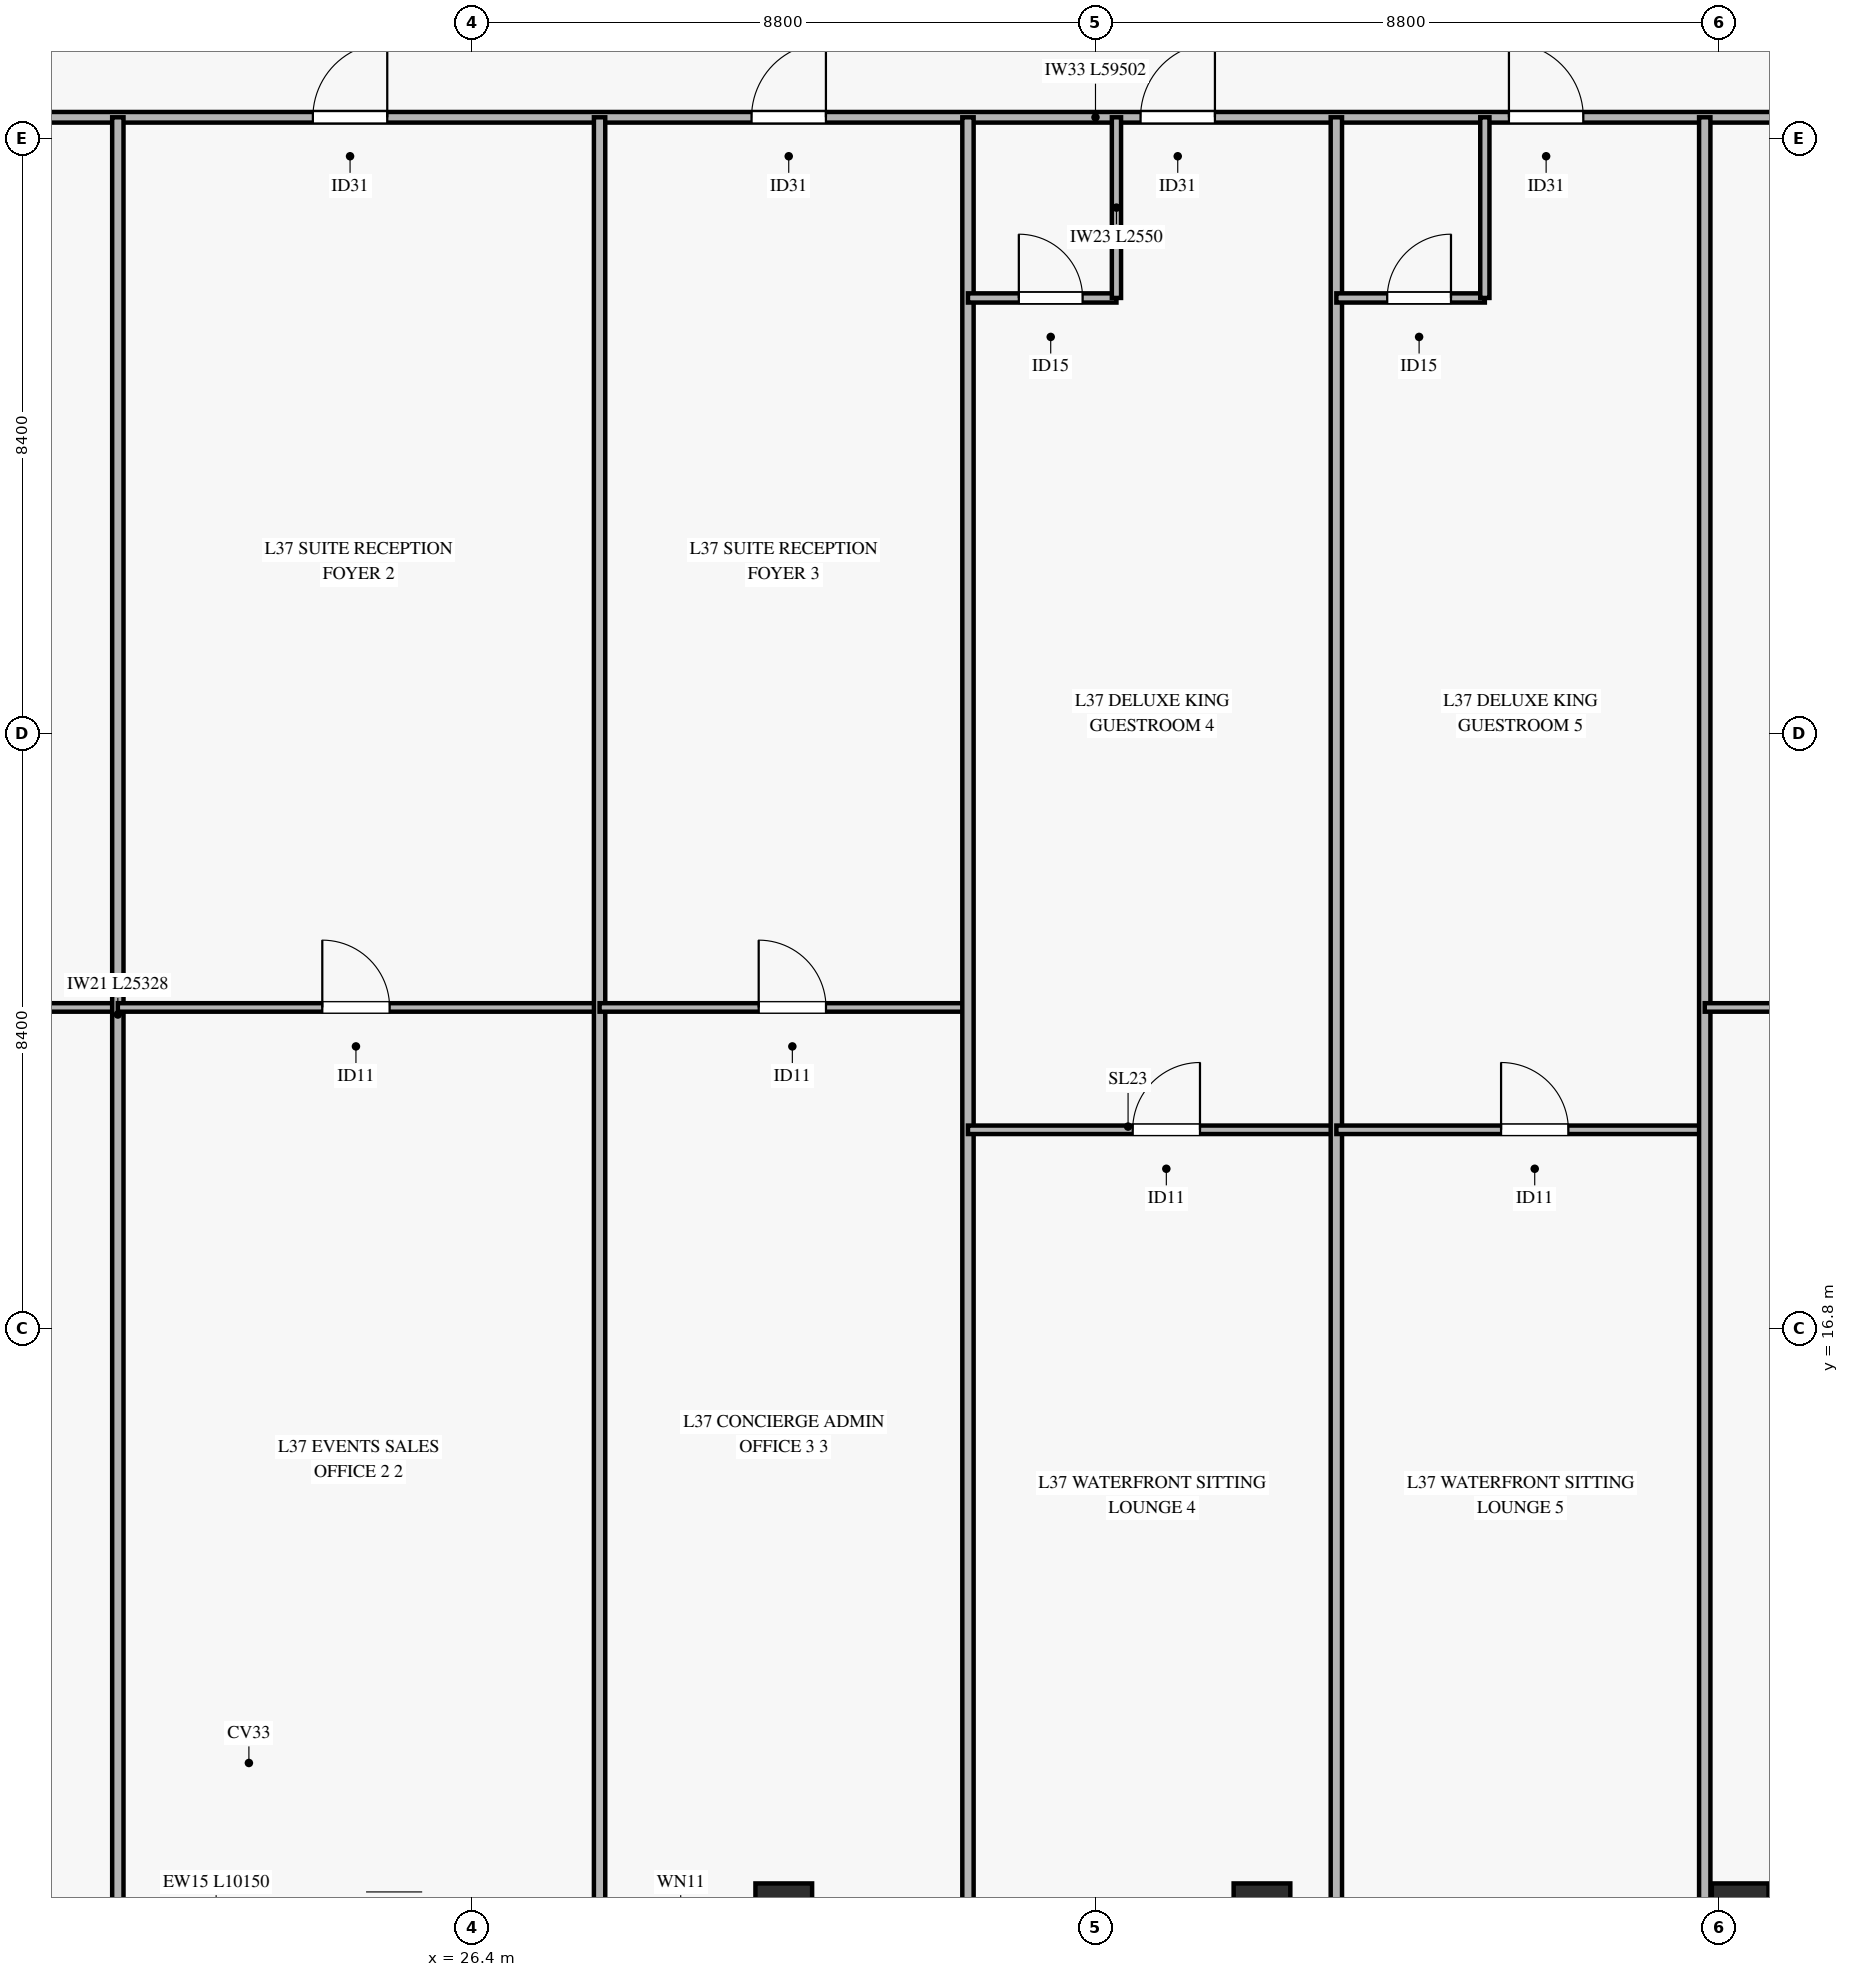
"""IFC4 building model, lengths in metres.
Left out: names, types, materials, properties, quantities, classifications, styles, units other than length and angle.
Written with IfcOpenShell. Run it as: python <this file> out.ifc"""

import sys

from ifc_helpers import new_model, si_unit, direction, frame, frame_2d, origin, origin_2d, place, context, subcontext, project, spatial, rectangle, hollow_rectangle, extrude, source, transform, mapped, element, fill, save


model = new_model("IFC4")
c1 = context("Model", 3, precision=1e-05, world=origin(), true_north=direction((0.0, 1.0)))
c2 = subcontext(c1, "Body", "Model", "MODEL_VIEW")
j1 = project(units=[si_unit("LENGTHUNIT", "METRE"), si_unit("PLANEANGLEUNIT", "RADIAN")], contexts=[c1])
p1 = place(None, origin())
s1 = spatial("IfcSite", under=j1, at=p1, CompositionType="ELEMENT")
p2 = place(p1, origin())
s2 = spatial("IfcBuilding", under=s1, at=p2, CompositionType="ELEMENT")
p3 = place(p2, frame((0.0, 0.0, 152.7)))
s3 = spatial("IfcBuildingStorey", under=s2, at=p3, CompositionType="ELEMENT", Elevation=152.7)
m1 = source(origin(), c2, "Body", "SweptSolid", [
    extrude(hollow_rectangle(XDim=0.8, YDim=0.8, WallThickness=0.036, at=origin_2d()), origin(), (0.0, 0.0, 1.0), 3.27),
])
for number, where, z_axis, x_axis in (
    (1, (30.8, 8.572, 0.0), (0.0, 0.0, 1.0), (1.0, 0.0, 0.0)),
    (2, (37.55, 8.572, 0.0), (0.0, 0.0, 1.0), (1.0, 0.0, 0.0)),
    (3, (44.3, 8.572, 0.0), (0.0, 0.0, 1.0), (1.0, 0.0, 0.0)),
):
    element("IfcColumn", number, at=place(p3, frame(where, z_axis=z_axis, x_axis=x_axis)), inside=s3, PredefinedType="COLUMN", context=c2, shape_type="MappedRepresentation", body=[
        mapped(m1, transform((0.0, 0.0, 0.0), x_axis=(1.0, 0.0, 0.0), y_axis=(0.0, 1.0, 0.0), z_axis=(0.0, 0.0, 1.0), scale=1.0)),
    ])
p4 = place(p3, frame((5.449, 33.9, 0.0), z_axis=(0.0, 0.0, 1.0), x_axis=(1.0, 0.0, 0.0)))
e4 = element("IfcWall", 4, at=p4, inside=s3, PredefinedType="PARTITIONING", context=c2, shape_type="SweptSolid", body=[
    extrude(rectangle(XDim=59.502, YDim=0.15, at=frame_2d((29.751, 0.0))), origin(), (0.0, 0.0, 1.0), 2.455),
])
p5 = place(p4, frame((6.355, 0.0, 0.0)))
e5 = element("IfcOpeningElement", 5, at=p5, cuts=e4, PredefinedType="OPENING", context=c2, shape_type="SweptSolid", body=[
    extrude(rectangle(XDim=1.05, YDim=2.15, at=frame_2d((0.525, 1.075))), frame((0.0, 0.085, 0.0), z_axis=(0.0, -1.0, 0.0), x_axis=(1.0, 0.0, 0.0)), (0.0, 0.0, 1.0), 0.17),
])
p6 = place(p4, frame((18.704, 0.0, 0.0)))
e6 = element("IfcOpeningElement", 6, at=p6, cuts=e4, PredefinedType="OPENING", context=c2, shape_type="SweptSolid", body=[
    extrude(rectangle(XDim=1.05, YDim=2.15, at=frame_2d((0.525, 1.075))), frame((0.0, 0.085, 0.0), z_axis=(0.0, -1.0, 0.0), x_axis=(1.0, 0.0, 0.0)), (0.0, 0.0, 1.0), 0.17),
])
p7 = place(p4, frame((24.896, 0.0, 0.0)))
e7 = element("IfcOpeningElement", 7, at=p7, cuts=e4, PredefinedType="OPENING", context=c2, shape_type="SweptSolid", body=[
    extrude(rectangle(XDim=1.05, YDim=2.15, at=frame_2d((0.525, 1.075))), frame((0.0, 0.085, 0.0), z_axis=(0.0, -1.0, 0.0), x_axis=(1.0, 0.0, 0.0)), (0.0, 0.0, 1.0), 0.17),
])
p8 = place(p4, frame((30.387, 0.0, 0.0)))
e8 = element("IfcOpeningElement", 8, at=p8, cuts=e4, PredefinedType="OPENING", context=c2, shape_type="SweptSolid", body=[
    extrude(rectangle(XDim=1.05, YDim=2.15, at=frame_2d((0.525, 1.075))), frame((0.0, 0.085, 0.0), z_axis=(0.0, -1.0, 0.0), x_axis=(1.0, 0.0, 0.0)), (0.0, 0.0, 1.0), 0.17),
])
p9 = place(p4, frame((35.587, 0.0, 0.0)))
e9 = element("IfcOpeningElement", 9, at=p9, cuts=e4, PredefinedType="OPENING", context=c2, shape_type="SweptSolid", body=[
    extrude(rectangle(XDim=1.05, YDim=2.15, at=frame_2d((0.525, 1.075))), frame((0.0, 0.085, 0.0), z_axis=(0.0, -1.0, 0.0), x_axis=(1.0, 0.0, 0.0)), (0.0, 0.0, 1.0), 0.17),
])
p10 = place(p4, frame((46.482, 0.0, 0.0)))
e10 = element("IfcOpeningElement", 10, at=p10, cuts=e4, PredefinedType="OPENING", context=c2, shape_type="SweptSolid", body=[
    extrude(rectangle(XDim=1.05, YDim=2.15, at=frame_2d((0.525, 1.075))), frame((0.0, 0.085, 0.0), z_axis=(0.0, -1.0, 0.0), x_axis=(1.0, 0.0, 0.0)), (0.0, 0.0, 1.0), 0.17),
])
p11 = place(p3, frame((5.449, 21.336, 0.0), z_axis=(0.0, 0.0, 1.0), x_axis=(1.0, 0.0, 0.0)))
e11 = element("IfcWall", 11, at=p11, inside=s3, PredefinedType="PARTITIONING", context=c2, shape_type="SweptSolid", body=[
    extrude(rectangle(XDim=15.951, YDim=0.12, at=frame_2d((7.976, 0.0))), origin(), (0.0, 0.0, 1.0), 2.455),
])
p12 = place(p11, frame((6.666, 0.0, 0.0)))
e12 = element("IfcOpeningElement", 12, at=p12, cuts=e11, PredefinedType="OPENING", context=c2, shape_type="SweptSolid", body=[
    extrude(rectangle(XDim=0.95, YDim=2.1, at=frame_2d((0.475, 1.05))), frame((0.0, 0.07, 0.0), z_axis=(0.0, -1.0, 0.0), x_axis=(1.0, 0.0, 0.0)), (0.0, 0.0, 1.0), 0.14),
])
p13 = place(p3, frame((21.4, 8.572, 0.0), z_axis=(0.0, 0.0, 1.0), x_axis=(0.0, 1.0, 0.0)))
e13 = element("IfcWall", 13, at=p13, inside=s3, PredefinedType="PARTITIONING", context=c2, shape_type="SweptSolid", body=[
    extrude(rectangle(XDim=25.328, YDim=0.16, at=frame_2d((12.664, 0.0))), origin(), (0.0, 0.0, 1.0), 2.755),
])
p14 = place(p3, frame((21.4, 21.336, 0.0), z_axis=(0.0, 0.0, 1.0), x_axis=(1.0, 0.0, 0.0)))
e14 = element("IfcWall", 14, at=p14, inside=s3, PredefinedType="PARTITIONING", context=c2, shape_type="SweptSolid", body=[
    extrude(rectangle(XDim=6.8, YDim=0.12, at=frame_2d((3.4, 0.0))), origin(), (0.0, 0.0, 1.0), 3.27),
])
p15 = place(p14, frame((2.886, 0.0, 0.0)))
e15 = element("IfcOpeningElement", 15, at=p15, cuts=e14, PredefinedType="OPENING", context=c2, shape_type="SweptSolid", body=[
    extrude(rectangle(XDim=0.95, YDim=2.1, at=frame_2d((0.475, 1.05))), frame((0.0, 0.07, 0.0), z_axis=(0.0, -1.0, 0.0), x_axis=(1.0, 0.0, 0.0)), (0.0, 0.0, 1.0), 0.14),
])
p16 = place(p3, frame((28.2, 8.572, 0.0), z_axis=(0.0, 0.0, 1.0), x_axis=(0.0, 1.0, 0.0)))
e16 = element("IfcWall", 16, at=p16, inside=s3, PredefinedType="PARTITIONING", context=c2, shape_type="SweptSolid", body=[
    extrude(rectangle(XDim=25.328, YDim=0.16, at=frame_2d((12.664, 0.0))), origin(), (0.0, 0.0, 1.0), 2.755),
])
p17 = place(p3, frame((28.2, 21.336, 0.0), z_axis=(0.0, 0.0, 1.0), x_axis=(1.0, 0.0, 0.0)))
e17 = element("IfcWall", 17, at=p17, inside=s3, PredefinedType="PARTITIONING", context=c2, shape_type="SweptSolid", body=[
    extrude(rectangle(XDim=5.2, YDim=0.12, at=frame_2d((2.6, 0.0))), origin(), (0.0, 0.0, 1.0), 2.455),
])
p18 = place(p17, frame((2.246, 0.0, 0.0)))
e18 = element("IfcOpeningElement", 18, at=p18, cuts=e17, PredefinedType="OPENING", context=c2, shape_type="SweptSolid", body=[
    extrude(rectangle(XDim=0.95, YDim=2.1, at=frame_2d((0.475, 1.05))), frame((0.0, 0.07, 0.0), z_axis=(0.0, -1.0, 0.0), x_axis=(1.0, 0.0, 0.0)), (0.0, 0.0, 1.0), 0.14),
])
p19 = place(p3, frame((33.4, 8.572, 0.0), z_axis=(0.0, 0.0, 1.0), x_axis=(0.0, 1.0, 0.0)))
e19 = element("IfcWall", 19, at=p19, inside=s3, PredefinedType="PARTITIONING", context=c2, shape_type="SweptSolid", body=[
    extrude(rectangle(XDim=25.328, YDim=0.16, at=frame_2d((12.664, 0.0))), origin(), (0.0, 0.0, 1.0), 2.755),
])
p20 = place(p3, frame((33.4, 31.35, 0.0), z_axis=(0.0, 0.0, 1.0), x_axis=(1.0, 0.0, 0.0)))
e20 = element("IfcWall", 20, at=p20, inside=s3, PredefinedType="PARTITIONING", context=c2, shape_type="SweptSolid", body=[
    extrude(rectangle(XDim=2.096, YDim=0.13, at=frame_2d((1.048, 0.0))), origin(), (0.0, 0.0, 1.0), 3.27),
])
p21 = place(p20, frame((0.718, 0.0, 0.0)))
e21 = element("IfcOpeningElement", 21, at=p21, cuts=e20, PredefinedType="OPENING", context=c2, shape_type="SweptSolid", body=[
    extrude(rectangle(XDim=0.9, YDim=2.1, at=frame_2d((0.45, 1.05))), frame((0.0, 0.075, 0.0), z_axis=(0.0, -1.0, 0.0), x_axis=(1.0, 0.0, 0.0)), (0.0, 0.0, 1.0), 0.15),
])
p22 = place(p3, frame((35.496, 31.35, 0.0), z_axis=(0.0, 0.0, 1.0), x_axis=(0.0, 1.0, 0.0)))
e22 = element("IfcWall", 22, at=p22, inside=s3, PredefinedType="PARTITIONING", context=c2, shape_type="SweptSolid", body=[
    extrude(rectangle(XDim=2.55, YDim=0.13, at=frame_2d((1.275, 0.0))), origin(), (0.0, 0.0, 1.0), 2.805),
])
p23 = place(p3, frame((33.4, 19.609, 0.0), z_axis=(0.0, 0.0, 1.0), x_axis=(1.0, 0.0, 0.0)))
e23 = element("IfcWall", 23, at=p23, inside=s3, PredefinedType="PARTITIONING", context=c2, shape_type="SweptSolid", body=[
    extrude(rectangle(XDim=5.2, YDim=0.12, at=frame_2d((2.6, 0.0))), origin(), (0.0, 0.0, 1.0), 2.455),
])
p24 = place(p23, frame((2.325, 0.0, 0.0)))
e24 = element("IfcOpeningElement", 24, at=p24, cuts=e23, PredefinedType="OPENING", context=c2, shape_type="SweptSolid", body=[
    extrude(rectangle(XDim=0.95, YDim=2.1, at=frame_2d((0.475, 1.05))), frame((0.0, 0.07, 0.0), z_axis=(0.0, -1.0, 0.0), x_axis=(1.0, 0.0, 0.0)), (0.0, 0.0, 1.0), 0.14),
])
p25 = place(p3, frame((38.6, 8.572, 0.0), z_axis=(0.0, 0.0, 1.0), x_axis=(0.0, 1.0, 0.0)))
e25 = element("IfcWall", 25, at=p25, inside=s3, PredefinedType="PARTITIONING", context=c2, shape_type="SweptSolid", body=[
    extrude(rectangle(XDim=25.328, YDim=0.16, at=frame_2d((12.664, 0.0))), origin(), (0.0, 0.0, 1.0), 2.755),
])
p26 = place(p3, frame((38.6, 31.35, 0.0), z_axis=(0.0, 0.0, 1.0), x_axis=(1.0, 0.0, 0.0)))
e26 = element("IfcWall", 26, at=p26, inside=s3, PredefinedType="PARTITIONING", context=c2, shape_type="SweptSolid", body=[
    extrude(rectangle(XDim=2.096, YDim=0.13, at=frame_2d((1.048, 0.0))), origin(), (0.0, 0.0, 1.0), 3.27),
])
p27 = place(p26, frame((0.718, 0.0, 0.0)))
e27 = element("IfcOpeningElement", 27, at=p27, cuts=e26, PredefinedType="OPENING", context=c2, shape_type="SweptSolid", body=[
    extrude(rectangle(XDim=0.9, YDim=2.1, at=frame_2d((0.45, 1.05))), frame((0.0, 0.075, 0.0), z_axis=(0.0, -1.0, 0.0), x_axis=(1.0, 0.0, 0.0)), (0.0, 0.0, 1.0), 0.15),
])
p28 = place(p3, frame((40.696, 31.35, 0.0), z_axis=(0.0, 0.0, 1.0), x_axis=(0.0, 1.0, 0.0)))
e28 = element("IfcWall", 28, at=p28, inside=s3, PredefinedType="PARTITIONING", context=c2, shape_type="SweptSolid", body=[
    extrude(rectangle(XDim=2.55, YDim=0.13, at=frame_2d((1.275, 0.0))), origin(), (0.0, 0.0, 1.0), 2.805),
])
p29 = place(p3, frame((38.6, 19.609, 0.0), z_axis=(0.0, 0.0, 1.0), x_axis=(1.0, 0.0, 0.0)))
e29 = element("IfcWall", 29, at=p29, inside=s3, PredefinedType="PARTITIONING", context=c2, shape_type="SweptSolid", body=[
    extrude(rectangle(XDim=5.2, YDim=0.12, at=frame_2d((2.6, 0.0))), origin(), (0.0, 0.0, 1.0), 3.27),
])
p30 = place(p29, frame((2.325, 0.0, 0.0)))
e30 = element("IfcOpeningElement", 30, at=p30, cuts=e29, PredefinedType="OPENING", context=c2, shape_type="SweptSolid", body=[
    extrude(rectangle(XDim=0.95, YDim=2.1, at=frame_2d((0.475, 1.05))), frame((0.0, 0.07, 0.0), z_axis=(0.0, -1.0, 0.0), x_axis=(1.0, 0.0, 0.0)), (0.0, 0.0, 1.0), 0.14),
])
p31 = place(p3, frame((43.8, 8.572, 0.0), z_axis=(0.0, 0.0, 1.0), x_axis=(0.0, 1.0, 0.0)))
e31 = element("IfcWall", 31, at=p31, inside=s3, PredefinedType="PARTITIONING", context=c2, shape_type="SweptSolid", body=[
    extrude(rectangle(XDim=25.328, YDim=0.16, at=frame_2d((12.664, 0.0))), origin(), (0.0, 0.0, 1.0), 2.755),
])
p32 = place(p3, frame((43.8, 21.336, 0.0), z_axis=(0.0, 0.0, 1.0), x_axis=(1.0, 0.0, 0.0)))
e32 = element("IfcWall", 32, at=p32, inside=s3, PredefinedType="PARTITIONING", context=c2, shape_type="SweptSolid", body=[
    extrude(rectangle(XDim=21.151, YDim=0.12, at=frame_2d((10.575, 0.0))), origin(), (0.0, 0.0, 1.0), 2.455),
])
p33 = place(p32, frame((8.546, 0.0, 0.0)))
e33 = element("IfcOpeningElement", 33, at=p33, cuts=e32, PredefinedType="OPENING", context=c2, shape_type="SweptSolid", body=[
    extrude(rectangle(XDim=0.95, YDim=2.1, at=frame_2d((0.475, 1.05))), frame((0.0, 0.07, 0.0), z_axis=(0.0, -1.0, 0.0), x_axis=(1.0, 0.0, 0.0)), (0.0, 0.0, 1.0), 0.14),
])
m2 = source(origin(), c2, "Body", "SweptSolid", [
    extrude(rectangle(XDim=1.05, YDim=2.15, at=frame_2d((0.525, 1.075))), frame((0.0, 0.025, 0.0), z_axis=(0.0, -1.0, 0.0), x_axis=(1.0, 0.0, 0.0)), (0.0, 0.0, 1.0), 0.05),
])
p34 = place(p6, origin())
e34 = element("IfcDoor", 34, at=p34, inside=s3, OperationType="SINGLE_SWING_RIGHT", PredefinedType="DOOR", context=c2, shape_type="MappedRepresentation", body=[
    mapped(m2, transform((0.0, 0.0, 0.0), x_axis=(1.0, 0.0, 0.0), y_axis=(0.0, 1.0, 0.0), z_axis=(0.0, 0.0, 1.0), scale=1.0)),
])
fill(e6, e34)
m3 = source(origin(), c2, "Body", "SweptSolid", [
    extrude(rectangle(XDim=0.95, YDim=2.1, at=frame_2d((0.475, 1.05))), frame((0.0, 0.025, 0.0), z_axis=(0.0, -1.0, 0.0), x_axis=(1.0, 0.0, 0.0)), (0.0, 0.0, 1.0), 0.05),
])
p35 = place(p15, origin())
e35 = element("IfcDoor", 35, at=p35, inside=s3, OperationType="SINGLE_SWING_LEFT", PredefinedType="DOOR", context=c2, shape_type="MappedRepresentation", body=[
    mapped(m3, transform((0.0, 0.0, 0.0), x_axis=(1.0, 0.0, 0.0), y_axis=(0.0, 1.0, 0.0), z_axis=(0.0, 0.0, 1.0), scale=1.0)),
])
fill(e15, e35)
p36 = place(p7, origin())
e36 = element("IfcDoor", 36, at=p36, inside=s3, OperationType="SINGLE_SWING_RIGHT", PredefinedType="DOOR", context=c2, shape_type="MappedRepresentation", body=[
    mapped(m2, transform((0.0, 0.0, 0.0), x_axis=(1.0, 0.0, 0.0), y_axis=(0.0, 1.0, 0.0), z_axis=(0.0, 0.0, 1.0), scale=1.0)),
])
fill(e7, e36)
p37 = place(p18, origin())
e37 = element("IfcDoor", 37, at=p37, inside=s3, OperationType="SINGLE_SWING_LEFT", PredefinedType="DOOR", context=c2, shape_type="MappedRepresentation", body=[
    mapped(m3, transform((0.0, 0.0, 0.0), x_axis=(1.0, 0.0, 0.0), y_axis=(0.0, 1.0, 0.0), z_axis=(0.0, 0.0, 1.0), scale=1.0)),
])
fill(e18, e37)
p38 = place(p8, origin())
e38 = element("IfcDoor", 38, at=p38, inside=s3, OperationType="SINGLE_SWING_RIGHT", PredefinedType="DOOR", context=c2, shape_type="MappedRepresentation", body=[
    mapped(m2, transform((0.0, 0.0, 0.0), x_axis=(1.0, 0.0, 0.0), y_axis=(0.0, 1.0, 0.0), z_axis=(0.0, 0.0, 1.0), scale=1.0)),
])
fill(e8, e38)
m4 = source(origin(), c2, "Body", "SweptSolid", [
    extrude(rectangle(XDim=0.9, YDim=2.1, at=frame_2d((0.45, 1.05))), frame((0.0, 0.025, 0.0), z_axis=(0.0, -1.0, 0.0), x_axis=(1.0, 0.0, 0.0)), (0.0, 0.0, 1.0), 0.05),
])
p39 = place(p21, origin())
e39 = element("IfcDoor", 39, at=p39, inside=s3, OperationType="SINGLE_SWING_LEFT", PredefinedType="DOOR", context=c2, shape_type="MappedRepresentation", body=[
    mapped(m4, transform((0.0, 0.0, 0.0), x_axis=(1.0, 0.0, 0.0), y_axis=(0.0, 1.0, 0.0), z_axis=(0.0, 0.0, 1.0), scale=1.0)),
])
fill(e21, e39)
p40 = place(p24, origin())
e40 = element("IfcDoor", 40, at=p40, inside=s3, OperationType="SINGLE_SWING_RIGHT", PredefinedType="DOOR", context=c2, shape_type="MappedRepresentation", body=[
    mapped(m3, transform((0.0, 0.0, 0.0), x_axis=(1.0, 0.0, 0.0), y_axis=(0.0, 1.0, 0.0), z_axis=(0.0, 0.0, 1.0), scale=1.0)),
])
fill(e24, e40)
p41 = place(p9, origin())
e41 = element("IfcDoor", 41, at=p41, inside=s3, OperationType="SINGLE_SWING_LEFT", PredefinedType="DOOR", context=c2, shape_type="MappedRepresentation", body=[
    mapped(m2, transform((0.0, 0.0, 0.0), x_axis=(1.0, 0.0, 0.0), y_axis=(0.0, 1.0, 0.0), z_axis=(0.0, 0.0, 1.0), scale=1.0)),
])
fill(e9, e41)
p42 = place(p27, origin())
e42 = element("IfcDoor", 42, at=p42, inside=s3, OperationType="SINGLE_SWING_RIGHT", PredefinedType="DOOR", context=c2, shape_type="MappedRepresentation", body=[
    mapped(m4, transform((0.0, 0.0, 0.0), x_axis=(1.0, 0.0, 0.0), y_axis=(0.0, 1.0, 0.0), z_axis=(0.0, 0.0, 1.0), scale=1.0)),
])
fill(e27, e42)
p43 = place(p30, origin())
e43 = element("IfcDoor", 43, at=p43, inside=s3, OperationType="SINGLE_SWING_LEFT", PredefinedType="DOOR", context=c2, shape_type="MappedRepresentation", body=[
    mapped(m3, transform((0.0, 0.0, 0.0), x_axis=(1.0, 0.0, 0.0), y_axis=(0.0, 1.0, 0.0), z_axis=(0.0, 0.0, 1.0), scale=1.0)),
])
fill(e30, e43)
save(model, sys.argv[1])
